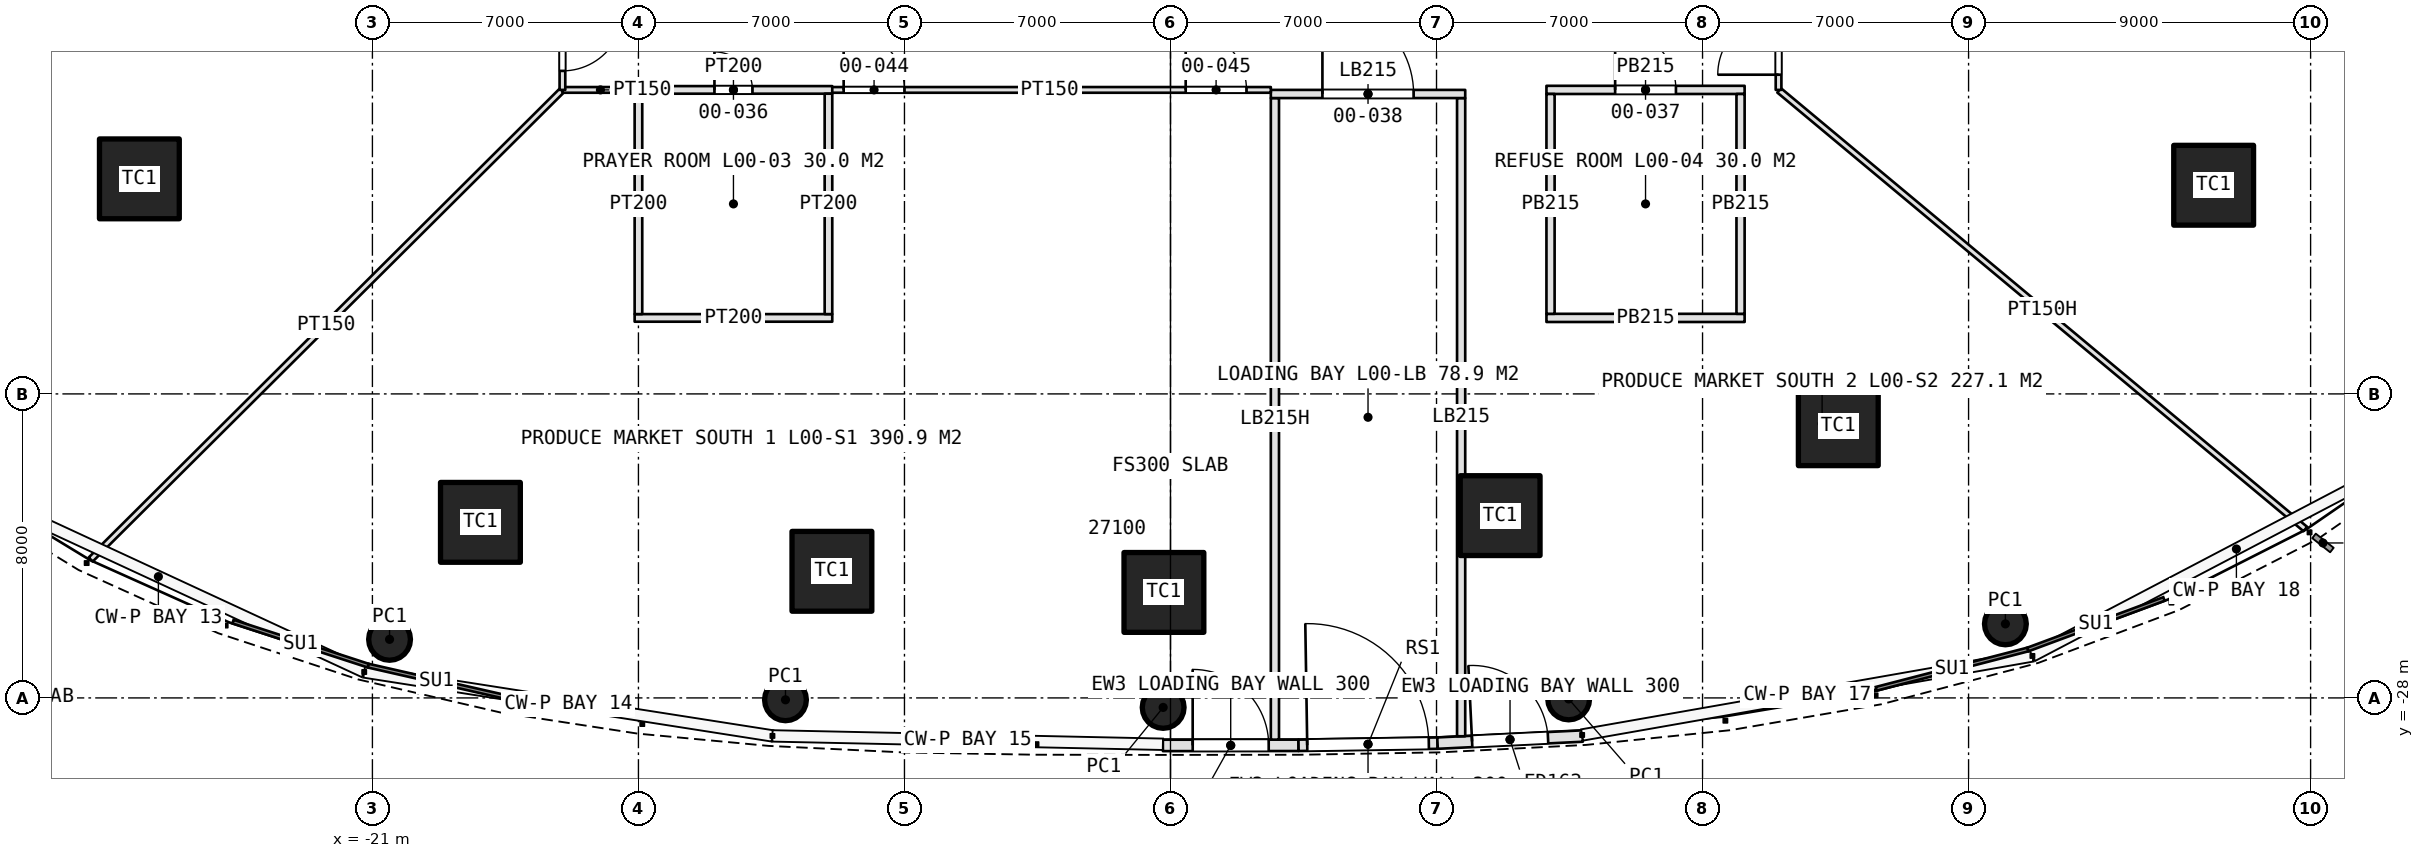
"""IFC4 building model, lengths in metres.
Left out: names, types, materials, properties, quantities, classifications, styles, units other than length and angle.
Written with IfcOpenShell. Run it as: python <this file> out.ifc"""

import sys

from ifc_helpers import new_model, si_unit, direction, frame, frame_2d, origin, origin_2d, place, context, subcontext, project, spatial, rectangle, circle, extrude, element, fill, save


model = new_model("IFC4")
c1 = context("Model", 3, precision=1e-05, world=origin(), true_north=direction((0.0, 1.0)))
c2 = subcontext(c1, "Body", "Model", "MODEL_VIEW")
j1 = project(units=[si_unit("LENGTHUNIT", "METRE"), si_unit("PLANEANGLEUNIT", "RADIAN")], contexts=[c1])
p1 = place(None, origin())
s1 = spatial("IfcSite", under=j1, at=p1, CompositionType="ELEMENT")
p2 = place(p1, origin())
s2 = spatial("IfcBuilding", under=s1, at=p2, CompositionType="ELEMENT")
p3 = place(p2, origin())
s3 = spatial("IfcBuildingStorey", under=s2, at=p3, CompositionType="ELEMENT", Elevation=0.0)
for number, where, z_axis, x_axis in (
    (1, (-27.132, -14.341, -0.3), (0.0, 0.0, 1.0), (1.0, 0.0, 0.0)),
    (2, (-18.158, -23.38, -0.3), (0.0, 0.0, 1.0), (1.0, 0.0, 0.0)),
    (3, (-8.909, -24.668, -0.3), (0.0, 0.0, 1.0), (1.0, 0.0, 0.0)),
    (4, (-0.173, -25.224, -0.3), (0.0, 0.0, 1.0), (1.0, 0.0, 0.0)),
    (5, (8.674, -23.203, -0.3), (0.0, 0.0, 1.0), (1.0, 0.0, 0.0)),
    (6, (17.572, -20.837, -0.3), (0.0, 0.0, 1.0), (1.0, 0.0, 0.0)),
    (7, (27.449, -14.509, -0.3), (0.0, 0.0, 1.0), (1.0, 0.0, 0.0)),
):
    element("IfcColumn", number, at=place(p3, frame(where, z_axis=z_axis, x_axis=x_axis)), inside=s3, PredefinedType="COLUMN", context=c2, shape_type="SweptSolid", body=[
        extrude(rectangle(XDim=2.1, YDim=2.1, at=origin_2d()), origin(), (0.0, 0.0, 1.0), 5.3),
    ])
for number, where, z_axis, x_axis in (
    (8, (-20.549, -26.459, -0.3), (0.0, 0.0, 1.0), (1.0, 0.0, 0.0)),
    (9, (-10.131, -28.05, -0.3), (0.0, 0.0, 1.0), (1.0, 0.0, 0.0)),
    (10, (-0.193, -28.25, -0.3), (0.0, 0.0, 1.0), (1.0, 0.0, 0.0)),
    (11, (10.477, -28.027, -0.3), (0.0, 0.0, 1.0), (1.0, 0.0, 0.0)),
    (12, (21.969, -26.052, -0.3), (0.0, 0.0, 1.0), (1.0, 0.0, 0.0)),
):
    element("IfcColumn", number, at=place(p3, frame(where, z_axis=z_axis, x_axis=x_axis)), inside=s3, PredefinedType="COLUMN", context=c2, shape_type="SweptSolid", body=[
        extrude(circle(Radius=0.55, at=origin_2d()), origin(), (0.0, 0.0, 1.0), 5.3),
    ])
p4 = place(p3, frame((-0.2, -29.25, 0.0), z_axis=(0.0, 0.0, 1.0), x_axis=(0.999999766076, 0.000683994368, 0.0)))
e13 = element("IfcWall", 13, at=p4, inside=s3, PredefinedType="SOLIDWALL", context=c2, shape_type="SweptSolid", body=[
    extrude(rectangle(XDim=3.569, YDim=0.3, at=frame_2d((1.785, 0.0))), origin(), (0.0, 0.0, 1.0), 5.0),
])
p5 = place(p4, frame((0.785, 0.0, 0.0)))
e14 = element("IfcOpeningElement", 14, at=p5, cuts=e13, PredefinedType="OPENING", context=c2, shape_type="SweptSolid", body=[
    extrude(rectangle(XDim=2.0, YDim=2.7, at=frame_2d((1.0, 1.35))), frame((0.0, 0.16, 0.0), z_axis=(0.0, -1.0, 0.0), x_axis=(1.0, 0.0, 0.0)), (0.0, 0.0, 1.0), 0.32),
])
p6 = place(p3, frame((3.369, -29.248, 0.0), z_axis=(0.0, 0.0, 1.0), x_axis=(0.99987486997, 0.015819115099, 0.0)))
e15 = element("IfcWall", 15, at=p6, inside=s3, PredefinedType="SOLIDWALL", context=c2, shape_type="SweptSolid", body=[
    extrude(rectangle(XDim=3.658, YDim=0.3, at=frame_2d((1.829, 0.0))), origin(), (0.0, 0.0, 1.0), 5.0),
])
p7 = place(p6, frame((0.229, 0.0, 0.0)))
e16 = element("IfcOpeningElement", 16, at=p7, cuts=e15, PredefinedType="OPENING", context=c2, shape_type="SweptSolid", body=[
    extrude(rectangle(XDim=3.2, YDim=4.2, at=frame_2d((1.6, 2.1))), frame((0.0, 0.16, 0.0), z_axis=(0.0, -1.0, 0.0), x_axis=(1.0, 0.0, 0.0)), (0.0, 0.0, 1.0), 0.32),
])
p8 = place(p3, frame((7.026, -29.19, 0.0), z_axis=(0.0, 0.0, 1.0), x_axis=(0.998807491797, 0.048822068057, 0.0)))
e17 = element("IfcWall", 17, at=p8, inside=s3, PredefinedType="SOLIDWALL", context=c2, shape_type="SweptSolid", body=[
    extrude(rectangle(XDim=3.821, YDim=0.3, at=frame_2d((1.91, 0.0))), origin(), (0.0, 0.0, 1.0), 5.0),
])
p9 = place(p8, frame((0.91, 0.0, 0.0)))
e18 = element("IfcOpeningElement", 18, at=p9, cuts=e17, PredefinedType="OPENING", context=c2, shape_type="SweptSolid", body=[
    extrude(rectangle(XDim=2.0, YDim=2.7, at=frame_2d((1.0, 1.35))), frame((0.0, 0.16, 0.0), z_axis=(0.0, -1.0, 0.0), x_axis=(1.0, 0.0, 0.0)), (0.0, 0.0, 1.0), 0.32),
])
p10 = place(p3, frame((2.748, -29.098, 0.0), z_axis=(0.0, 0.0, 1.0), x_axis=(0.0, 1.0, 0.0)))
e19 = element("IfcWall", 19, at=p10, inside=s3, PredefinedType="PARTITIONING", context=c2, shape_type="SweptSolid", body=[
    extrude(rectangle(XDim=16.883, YDim=0.215, at=frame_2d((8.441, 0.0))), origin(), (0.0, 0.0, 1.0), 4.066),
])
p11 = place(p3, frame((7.648, -29.009, 0.0), z_axis=(0.0, 0.0, 1.0), x_axis=(0.0, 1.0, 0.0)))
e20 = element("IfcWall", 20, at=p11, inside=s3, PredefinedType="PARTITIONING", context=c2, shape_type="SweptSolid", body=[
    extrude(rectangle(XDim=16.794, YDim=0.215, at=frame_2d((8.397, 0.0))), origin(), (0.0, 0.0, 1.0), 4.75),
])
p12 = place(p3, frame((2.64, -12.107, 0.0), z_axis=(0.0, 0.0, 1.0), x_axis=(1.0, 0.0, 0.0)))
e21 = element("IfcWall", 21, at=p12, inside=s3, PredefinedType="PARTITIONING", context=c2, shape_type="SweptSolid", body=[
    extrude(rectangle(XDim=5.115, YDim=0.215, at=frame_2d((2.558, 0.0))), origin(), (0.0, 0.0, 1.0), 4.75),
])
p13 = place(p12, frame((1.357, 0.0, 0.0)))
e22 = element("IfcOpeningElement", 22, at=p13, cuts=e21, PredefinedType="OPENING", context=c2, shape_type="SweptSolid", body=[
    extrude(rectangle(XDim=2.4, YDim=2.4, at=frame_2d((1.2, 1.2))), frame((0.0, 0.118, 0.0), z_axis=(0.0, -1.0, 0.0), x_axis=(1.0, 0.0, 0.0)), (0.0, 0.0, 1.0), 0.235),
])
p14 = place(p3, frame((-16.014, -12.014, 0.0), z_axis=(0.0, 0.0, 1.0), x_axis=(-0.708660986583, -0.705549152147, 0.0)))
e23 = element("IfcWall", 23, at=p14, inside=s3, PredefinedType="PARTITIONING", context=c2, shape_type="SweptSolid", body=[
    extrude(rectangle(XDim=17.496, YDim=0.15, at=frame_2d((8.748, 0.0))), origin(), (0.0, 0.0, 1.0), 4.2),
])
p15 = place(p3, frame((16.015, -12.013, 0.0), z_axis=(0.0, 0.0, 1.0), x_axis=(0.768089154528, -0.640342916488, 0.0)))
e24 = element("IfcWall", 24, at=p15, inside=s3, PredefinedType="PARTITIONING", context=c2, shape_type="SweptSolid", body=[
    extrude(rectangle(XDim=18.026, YDim=0.15, at=frame_2d((9.013, 0.0))), origin(), (0.0, 0.0, 1.0), 4.066),
])
p16 = place(p3, frame((16.0, -12.0, 0.0), z_axis=(0.0, 0.0, 1.0), x_axis=(0.0, 1.0, 0.0)))
e25 = element("IfcWall", 25, at=p16, inside=s3, PredefinedType="PARTITIONING", context=c2, shape_type="SweptSolid", body=[
    extrude(rectangle(XDim=24.0, YDim=0.15, at=frame_2d((12.0, 0.0))), origin(), (0.0, 0.0, 1.0), 4.2),
])
p17 = place(p16, frame((10.4, 0.0, 0.0)))
e26 = element("IfcOpeningElement", 26, at=p17, cuts=e25, PredefinedType="OPENING", context=c2, shape_type="SweptSolid", body=[
    extrude(rectangle(XDim=1.6, YDim=2.4, at=frame_2d((0.8, 1.2))), frame((0.0, 0.085, 0.0), z_axis=(0.0, -1.0, 0.0), x_axis=(1.0, 0.0, 0.0)), (0.0, 0.0, 1.0), 0.17),
])
p18 = place(p16, frame((21.9, 0.0, 0.0)))
e27 = element("IfcOpeningElement", 27, at=p18, cuts=e25, PredefinedType="OPENING", context=c2, shape_type="SweptSolid", body=[
    extrude(rectangle(XDim=1.6, YDim=2.4, at=frame_2d((0.8, 1.2))), frame((0.0, 0.085, 0.0), z_axis=(0.0, -1.0, 0.0), x_axis=(1.0, 0.0, 0.0)), (0.0, 0.0, 1.0), 0.17),
])
p19 = place(p16, frame((0.4, 0.0, 0.0)))
e28 = element("IfcOpeningElement", 28, at=p19, cuts=e25, PredefinedType="OPENING", context=c2, shape_type="SweptSolid", body=[
    extrude(rectangle(XDim=1.6, YDim=2.4, at=frame_2d((0.8, 1.2))), frame((0.0, 0.085, 0.0), z_axis=(0.0, -1.0, 0.0), x_axis=(1.0, 0.0, 0.0)), (0.0, 0.0, 1.0), 0.17),
])
p20 = place(p3, frame((-16.0, -12.0, 0.0), z_axis=(0.0, 0.0, 1.0), x_axis=(1.0, 0.0, 0.0)))
e29 = element("IfcWall", 29, at=p20, inside=s3, PredefinedType="PARTITIONING", context=c2, shape_type="SweptSolid", body=[
    extrude(rectangle(XDim=2.0, YDim=0.15, at=frame_2d((1.0, 0.0))), origin(), (0.0, 0.0, 1.0), 4.2),
])
p21 = place(p3, frame((-9.0, -12.0, 0.0), z_axis=(0.0, 0.0, 1.0), x_axis=(1.0, 0.0, 0.0)))
e30 = element("IfcWall", 30, at=p21, inside=s3, PredefinedType="PARTITIONING", context=c2, shape_type="SweptSolid", body=[
    extrude(rectangle(XDim=11.64, YDim=0.15, at=frame_2d((5.82, 0.0))), origin(), (0.0, 0.0, 1.0), 4.2),
])
p22 = place(p21, frame((0.4, 0.0, 0.0)))
e31 = element("IfcOpeningElement", 31, at=p22, cuts=e30, PredefinedType="OPENING", context=c2, shape_type="SweptSolid", body=[
    extrude(rectangle(XDim=1.6, YDim=2.4, at=frame_2d((0.8, 1.2))), frame((0.0, 0.085, 0.0), z_axis=(0.0, -1.0, 0.0), x_axis=(1.0, 0.0, 0.0)), (0.0, 0.0, 1.0), 0.17),
])
p23 = place(p21, frame((9.4, 0.0, 0.0)))
e32 = element("IfcOpeningElement", 32, at=p23, cuts=e30, PredefinedType="OPENING", context=c2, shape_type="SweptSolid", body=[
    extrude(rectangle(XDim=1.6, YDim=2.4, at=frame_2d((0.8, 1.2))), frame((0.0, 0.085, 0.0), z_axis=(0.0, -1.0, 0.0), x_axis=(1.0, 0.0, 0.0)), (0.0, 0.0, 1.0), 0.17),
])
p24 = place(p3, frame((-16.0, 12.0, 0.0), z_axis=(0.0, 0.0, 1.0), x_axis=(0.0, -1.0, 0.0)))
e33 = element("IfcWall", 33, at=p24, inside=s3, PredefinedType="PARTITIONING", context=c2, shape_type="SweptSolid", body=[
    extrude(rectangle(XDim=24.0, YDim=0.15, at=frame_2d((12.0, 0.0))), origin(), (0.0, 0.0, 1.0), 4.2),
])
p25 = place(p24, frame((12.15, 0.0, 0.0)))
e34 = element("IfcOpeningElement", 34, at=p25, cuts=e33, PredefinedType="OPENING", context=c2, shape_type="SweptSolid", body=[
    extrude(rectangle(XDim=1.6, YDim=2.4, at=frame_2d((0.8, 1.2))), frame((0.0, 0.085, 0.0), z_axis=(0.0, -1.0, 0.0), x_axis=(1.0, 0.0, 0.0)), (0.0, 0.0, 1.0), 0.17),
])
p26 = place(p24, frame((0.4, 0.0, 0.0)))
e35 = element("IfcOpeningElement", 35, at=p26, cuts=e33, PredefinedType="OPENING", context=c2, shape_type="SweptSolid", body=[
    extrude(rectangle(XDim=1.6, YDim=2.4, at=frame_2d((0.8, 1.2))), frame((0.0, 0.085, 0.0), z_axis=(0.0, -1.0, 0.0), x_axis=(1.0, 0.0, 0.0)), (0.0, 0.0, 1.0), 0.17),
])
p27 = place(p24, frame((21.9, 0.0, 0.0)))
e36 = element("IfcOpeningElement", 36, at=p27, cuts=e33, PredefinedType="OPENING", context=c2, shape_type="SweptSolid", body=[
    extrude(rectangle(XDim=1.6, YDim=2.4, at=frame_2d((0.8, 1.2))), frame((0.0, 0.085, 0.0), z_axis=(0.0, -1.0, 0.0), x_axis=(1.0, 0.0, 0.0)), (0.0, 0.0, 1.0), 0.17),
])
p28 = place(p3, frame((-14.1, -18.0, 0.0), z_axis=(0.0, 0.0, 1.0), x_axis=(1.0, 0.0, 0.0)))
e37 = element("IfcWall", 37, at=p28, inside=s3, PredefinedType="PARTITIONING", context=c2, shape_type="SweptSolid", body=[
    extrude(rectangle(XDim=5.2, YDim=0.2, at=frame_2d((2.6, 0.0))), origin(), (0.0, 0.0, 1.0), 4.2),
])
p29 = place(p3, frame((-14.1, -12.0, 0.0), z_axis=(0.0, 0.0, 1.0), x_axis=(1.0, 0.0, 0.0)))
e38 = element("IfcWall", 38, at=p29, inside=s3, PredefinedType="PARTITIONING", context=c2, shape_type="SweptSolid", body=[
    extrude(rectangle(XDim=5.2, YDim=0.2, at=frame_2d((2.6, 0.0))), origin(), (0.0, 0.0, 1.0), 4.2),
])
p30 = place(p29, frame((2.1, 0.0, 0.0)))
e39 = element("IfcOpeningElement", 39, at=p30, cuts=e38, PredefinedType="OPENING", context=c2, shape_type="SweptSolid", body=[
    extrude(rectangle(XDim=1.0, YDim=2.2, at=frame_2d((0.5, 1.1))), frame((0.0, 0.11, 0.0), z_axis=(0.0, -1.0, 0.0), x_axis=(1.0, 0.0, 0.0)), (0.0, 0.0, 1.0), 0.22),
])
for number, where, z_axis, x_axis in (
    (40, (-14.0, -17.9, 0.0), (0.0, 0.0, 1.0), (0.0, 1.0, 0.0)),
    (41, (-9.0, -17.9, 0.0), (0.0, 0.0, 1.0), (0.0, 1.0, 0.0)),
):
    element("IfcWall", number, at=place(p3, frame(where, z_axis=z_axis, x_axis=x_axis)), inside=s3, PredefinedType="PARTITIONING", context=c2, shape_type="SweptSolid", body=[
        extrude(rectangle(XDim=5.8, YDim=0.2, at=frame_2d((2.9, 0.0))), origin(), (0.0, 0.0, 1.0), 4.2),
    ])
p31 = place(p3, frame((9.893, -18.0, 0.0), z_axis=(0.0, 0.0, 1.0), x_axis=(1.0, 0.0, 0.0)))
e42 = element("IfcWall", 42, at=p31, inside=s3, PredefinedType="PARTITIONING", context=c2, shape_type="SweptSolid", body=[
    extrude(rectangle(XDim=5.215, YDim=0.215, at=frame_2d((2.607, 0.0))), origin(), (0.0, 0.0, 1.0), 4.2),
])
p32 = place(p3, frame((9.893, -12.0, 0.0), z_axis=(0.0, 0.0, 1.0), x_axis=(1.0, 0.0, 0.0)))
e43 = element("IfcWall", 43, at=p32, inside=s3, PredefinedType="PARTITIONING", context=c2, shape_type="SweptSolid", body=[
    extrude(rectangle(XDim=5.215, YDim=0.215, at=frame_2d((2.607, 0.0))), origin(), (0.0, 0.0, 1.0), 4.2),
])
p33 = place(p32, frame((1.808, 0.0, 0.0)))
e44 = element("IfcOpeningElement", 44, at=p33, cuts=e43, PredefinedType="OPENING", context=c2, shape_type="SweptSolid", body=[
    extrude(rectangle(XDim=1.6, YDim=2.4, at=frame_2d((0.8, 1.2))), frame((0.0, 0.118, 0.0), z_axis=(0.0, -1.0, 0.0), x_axis=(1.0, 0.0, 0.0)), (0.0, 0.0, 1.0), 0.235),
])
for number, where, z_axis, x_axis in (
    (45, (10.0, -17.893, 0.0), (0.0, 0.0, 1.0), (0.0, 1.0, 0.0)),
    (46, (15.0, -17.893, 0.0), (0.0, 0.0, 1.0), (0.0, 1.0, 0.0)),
):
    element("IfcWall", number, at=place(p3, frame(where, z_axis=z_axis, x_axis=x_axis)), inside=s3, PredefinedType="PARTITIONING", context=c2, shape_type="SweptSolid", body=[
        extrude(rectangle(XDim=5.785, YDim=0.215, at=frame_2d((2.893, 0.0))), origin(), (0.0, 0.0, 1.0), 4.2),
    ])
p34 = place(p5, origin())
e47 = element("IfcDoor", 47, at=p34, inside=s3, OperationType="DOUBLE_DOOR_DOUBLE_SWING", PredefinedType="DOOR", context=c2, shape_type="SweptSolid", body=[
    extrude(rectangle(XDim=2.0, YDim=2.7, at=frame_2d((1.0, 1.35))), frame((0.0, 0.025, 0.0), z_axis=(0.0, -1.0, 0.0), x_axis=(1.0, 0.0, 0.0)), (0.0, 0.0, 1.0), 0.05),
])
fill(e14, e47)
p35 = place(p7, origin())
e48 = element("IfcDoor", 48, at=p35, inside=s3, OperationType="ROLLINGUP", PredefinedType="DOOR", context=c2, shape_type="SweptSolid", body=[
    extrude(rectangle(XDim=3.2, YDim=4.2, at=frame_2d((1.6, 2.1))), frame((0.0, 0.025, 0.0), z_axis=(0.0, -1.0, 0.0), x_axis=(1.0, 0.0, 0.0)), (0.0, 0.0, 1.0), 0.05),
])
fill(e16, e48)
p36 = place(p9, origin())
e49 = element("IfcDoor", 49, at=p36, inside=s3, OperationType="DOUBLE_DOOR_DOUBLE_SWING", PredefinedType="DOOR", context=c2, shape_type="SweptSolid", body=[
    extrude(rectangle(XDim=2.0, YDim=2.7, at=frame_2d((1.0, 1.35))), frame((0.0, 0.025, 0.0), z_axis=(0.0, -1.0, 0.0), x_axis=(1.0, 0.0, 0.0)), (0.0, 0.0, 1.0), 0.05),
])
fill(e18, e49)
p37 = place(p30, origin())
e50 = element("IfcDoor", 50, at=p37, inside=s3, OperationType="SINGLE_SWING_LEFT", PredefinedType="DOOR", context=c2, shape_type="SweptSolid", body=[
    extrude(rectangle(XDim=1.0, YDim=2.2, at=frame_2d((0.5, 1.1))), frame((0.0, 0.025, 0.0), z_axis=(0.0, -1.0, 0.0), x_axis=(1.0, 0.0, 0.0)), (0.0, 0.0, 1.0), 0.05),
])
fill(e39, e50)
p38 = place(p33, origin())
e51 = element("IfcDoor", 51, at=p38, inside=s3, OperationType="DOUBLE_DOOR_SINGLE_SWING", PredefinedType="DOOR", context=c2, shape_type="SweptSolid", body=[
    extrude(rectangle(XDim=1.6, YDim=2.4, at=frame_2d((0.8, 1.2))), frame((0.0, 0.025, 0.0), z_axis=(0.0, -1.0, 0.0), x_axis=(1.0, 0.0, 0.0)), (0.0, 0.0, 1.0), 0.05),
])
fill(e44, e51)
p39 = place(p13, origin())
e52 = element("IfcDoor", 52, at=p39, inside=s3, OperationType="DOUBLE_DOOR_SINGLE_SWING", PredefinedType="DOOR", context=c2, shape_type="SweptSolid", body=[
    extrude(rectangle(XDim=2.4, YDim=2.4, at=frame_2d((1.2, 1.2))), frame((0.0, 0.025, 0.0), z_axis=(0.0, -1.0, 0.0), x_axis=(1.0, 0.0, 0.0)), (0.0, 0.0, 1.0), 0.05),
])
fill(e22, e52)
p40 = place(p19, origin())
e53 = element("IfcDoor", 53, at=p40, inside=s3, OperationType="DOUBLE_DOOR_SINGLE_SWING", PredefinedType="DOOR", context=c2, shape_type="SweptSolid", body=[
    extrude(rectangle(XDim=1.6, YDim=2.4, at=frame_2d((0.8, 1.2))), frame((0.0, 0.025, 0.0), z_axis=(0.0, -1.0, 0.0), x_axis=(1.0, 0.0, 0.0)), (0.0, 0.0, 1.0), 0.05),
])
fill(e28, e53)
p41 = place(p22, origin())
e54 = element("IfcDoor", 54, at=p41, inside=s3, OperationType="DOUBLE_DOOR_SINGLE_SWING", PredefinedType="DOOR", context=c2, shape_type="SweptSolid", body=[
    extrude(rectangle(XDim=1.6, YDim=2.4, at=frame_2d((0.8, 1.2))), frame((0.0, 0.025, 0.0), z_axis=(0.0, -1.0, 0.0), x_axis=(1.0, 0.0, 0.0)), (0.0, 0.0, 1.0), 0.05),
])
fill(e31, e54)
p42 = place(p23, origin())
e55 = element("IfcDoor", 55, at=p42, inside=s3, OperationType="DOUBLE_DOOR_SINGLE_SWING", PredefinedType="DOOR", context=c2, shape_type="SweptSolid", body=[
    extrude(rectangle(XDim=1.6, YDim=2.4, at=frame_2d((0.8, 1.2))), frame((0.0, 0.025, 0.0), z_axis=(0.0, -1.0, 0.0), x_axis=(1.0, 0.0, 0.0)), (0.0, 0.0, 1.0), 0.05),
])
fill(e32, e55)
p43 = place(p27, origin())
e56 = element("IfcDoor", 56, at=p43, inside=s3, OperationType="DOUBLE_DOOR_SINGLE_SWING", PredefinedType="DOOR", context=c2, shape_type="SweptSolid", body=[
    extrude(rectangle(XDim=1.6, YDim=2.4, at=frame_2d((0.8, 1.2))), frame((0.0, 0.025, 0.0), z_axis=(0.0, -1.0, 0.0), x_axis=(1.0, 0.0, 0.0)), (0.0, 0.0, 1.0), 0.05),
])
fill(e36, e56)
save(model, sys.argv[1])
